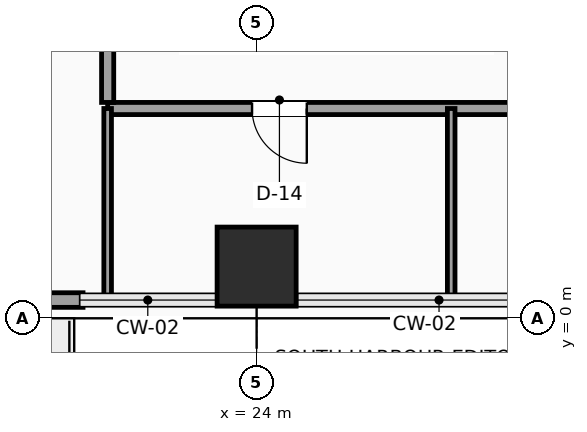
"""IFC4 building model, lengths in metres.
Left out: names, types, materials, properties, quantities, classifications, styles, units other than length and angle.
Written with IfcOpenShell. Run it as: python <this file> out.ifc"""

import sys

from ifc_helpers import new_model, si_unit, direction, frame, frame_2d, origin, origin_2d, place, context, subcontext, project, spatial, rectangle, extrude, element, fill, save


model = new_model("IFC4")
c1 = context("Model", 3, precision=1e-05, world=origin(), true_north=direction((0.0, 1.0)))
c2 = subcontext(c1, "Body", "Model", "MODEL_VIEW")
j1 = project(units=[si_unit("LENGTHUNIT", "METRE"), si_unit("PLANEANGLEUNIT", "RADIAN")], contexts=[c1])
p1 = place(None, origin())
s1 = spatial("IfcSite", under=j1, at=p1, CompositionType="ELEMENT")
p2 = place(p1, origin())
s2 = spatial("IfcBuilding", under=s1, at=p2, CompositionType="ELEMENT")
p3 = place(p2, frame((0.0, 0.0, 51.9)))
s3 = spatial("IfcBuildingStorey", under=s2, at=p3, CompositionType="ELEMENT", Elevation=51.9)
p4 = place(p3, frame((24.0, 0.85, 0.0), z_axis=(0.0, 0.0, 1.0), x_axis=(1.0, 0.0, 0.0)))
e1 = element("IfcColumn", 1, at=p4, inside=s3, PredefinedType="COLUMN", context=c2, shape_type="SweptSolid", body=[
    extrude(rectangle(XDim=1.3, YDim=1.3, at=origin_2d()), origin(), (0.0, 0.0, 1.0), 3.9),
])
p5 = place(p3, frame((21.145, 0.3, 0.0), z_axis=(0.0, 0.0, 1.0), x_axis=(-1.0, 0.0, 0.0)))
e2 = element("IfcWall", 2, at=p5, inside=s3, PredefinedType="SOLIDWALL", context=c2, shape_type="SweptSolid", body=[
    extrude(rectangle(XDim=9.29, YDim=0.24, at=frame_2d((4.645, 0.0))), origin(), (0.0, 0.0, 1.0), 3.65),
])
p6 = place(p5, frame((4.45, 0.0, 0.0)))
e3 = element("IfcOpeningElement", 3, at=p6, cuts=e2, PredefinedType="OPENING", context=c2, shape_type="SweptSolid", body=[
    extrude(rectangle(XDim=1.05, YDim=2.2, at=frame_2d((0.525, 1.1))), frame((0.0, 0.13, 0.0), z_axis=(0.0, -1.0, 0.0), x_axis=(1.0, 0.0, 0.0)), (0.0, 0.0, 1.0), 0.26),
])
p7 = place(p3, frame((36.15, 3.45, 0.0), z_axis=(0.0, 0.0, 1.0), x_axis=(-1.0, 0.0, 0.0)))
e4 = element("IfcWall", 4, at=p7, inside=s3, PredefinedType="PARTITIONING", context=c2, shape_type="SweptSolid", body=[
    extrude(rectangle(XDim=14.6, YDim=0.2, at=frame_2d((7.3, 0.0))), origin(), (0.0, 0.0, 1.0), 3.142),
])
p8 = place(p7, frame((11.325, 0.0, 0.0)))
e5 = element("IfcOpeningElement", 5, at=p8, cuts=e4, PredefinedType="OPENING", context=c2, shape_type="SweptSolid", body=[
    extrude(rectangle(XDim=0.9, YDim=2.1, at=frame_2d((0.45, 1.05))), frame((0.0, 0.11, 0.0), z_axis=(0.0, -1.0, 0.0), x_axis=(1.0, 0.0, 0.0)), (0.0, 0.0, 1.0), 0.22),
])
p9 = place(p7, frame((5.7, 0.0, 0.0)))
e6 = element("IfcOpeningElement", 6, at=p9, cuts=e4, PredefinedType="OPENING", context=c2, shape_type="SweptSolid", body=[
    extrude(rectangle(XDim=0.9, YDim=2.1, at=frame_2d((0.45, 1.05))), frame((0.0, 0.11, 0.0), z_axis=(0.0, -1.0, 0.0), x_axis=(1.0, 0.0, 0.0)), (0.0, 0.0, 1.0), 0.22),
])
p10 = place(p3, frame((21.55, 3.55, 0.0), z_axis=(0.0, 0.0, 1.0), x_axis=(0.0, 1.0, 0.0)))
e7 = element("IfcWall", 7, at=p10, inside=s3, PredefinedType="PARTITIONING", context=c2, shape_type="SweptSolid", body=[
    extrude(rectangle(XDim=2.25, YDim=0.2, at=frame_2d((1.125, 0.0))), origin(), (0.0, 0.0, 1.0), 3.65),
])
for number, where, z_axis, x_axis in (
    (8, (21.55, 0.3, 0.0), (0.0, 0.0, 1.0), (0.0, 1.0, 0.0)),
    (9, (27.2, 0.3, 0.0), (0.0, 0.0, 1.0), (0.0, 1.0, 0.0)),
):
    element("IfcWall", number, at=place(p3, frame(where, z_axis=z_axis, x_axis=x_axis)), inside=s3, PredefinedType="PARTITIONING", context=c2, shape_type="SweptSolid", body=[
        extrude(rectangle(XDim=3.15, YDim=0.125, at=frame_2d((1.575, 0.0))), origin(), (0.0, 0.0, 1.0), 3.65),
    ])
p11 = place(p8, origin())
e10 = element("IfcDoor", 10, at=p11, inside=s3, OperationType="SINGLE_SWING_LEFT", PredefinedType="DOOR", context=c2, shape_type="SweptSolid", body=[
    extrude(rectangle(XDim=0.9, YDim=2.1, at=frame_2d((0.45, 1.05))), frame((0.0, 0.025, 0.0), z_axis=(0.0, -1.0, 0.0), x_axis=(1.0, 0.0, 0.0)), (0.0, 0.0, 1.0), 0.05),
])
fill(e5, e10)
save(model, sys.argv[1])
